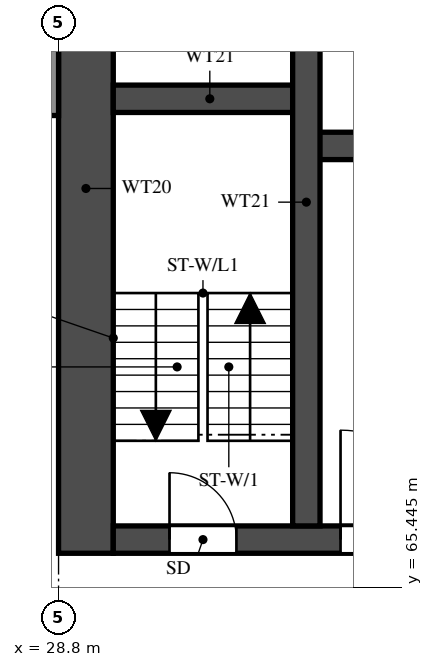
"""IFC4 building model, lengths in metres.
Left out: names, types, materials, properties, quantities, classifications, styles, units other than length and angle.
Written with IfcOpenShell. Run it as: python <this file> out.ifc"""

import sys

from ifc_helpers import new_model, si_unit, direction, frame, frame_2d, origin, place, context, subcontext, project, spatial, rectangle, extrude, element, fill, save


model = new_model("IFC4")
c1 = context("Model", 3, precision=1e-05, world=origin(), true_north=direction((0.0, 1.0)))
c2 = subcontext(c1, "Body", "Model", "MODEL_VIEW")
j1 = project(units=[si_unit("LENGTHUNIT", "METRE"), si_unit("PLANEANGLEUNIT", "RADIAN")], contexts=[c1])
p1 = place(None, origin())
s1 = spatial("IfcSite", under=j1, at=p1, CompositionType="ELEMENT")
p2 = place(p1, origin())
s2 = spatial("IfcBuilding", under=s1, at=p2, CompositionType="ELEMENT")
p3 = place(p2, frame((0.0, 0.0, 69.0)))
s3 = spatial("IfcBuildingStorey", under=s2, at=p3, CompositionType="ELEMENT", Elevation=69.0)
p4 = place(p3, frame((29.25, 66.0, 0.0), z_axis=(0.0, 0.0, 1.0), x_axis=(0.0, 1.0, 0.0)))
e1 = element("IfcWall", 1, at=p4, inside=s3, PredefinedType="SHEAR", context=c2, shape_type="SweptSolid", body=[
    extrude(rectangle(XDim=12.0, YDim=0.9, at=frame_2d((6.0, 0.0))), origin(), (0.0, 0.0, 1.0), 3.18),
])
p5 = place(p3, frame((29.7, 66.225, 0.0), z_axis=(0.0, 0.0, 1.0), x_axis=(1.0, 0.0, 0.0)))
e2 = element("IfcWall", 2, at=p5, inside=s3, PredefinedType="SHEAR", context=c2, shape_type="SweptSolid", body=[
    extrude(rectangle(XDim=41.4, YDim=0.45, at=frame_2d((20.7, 0.0))), origin(), (0.0, 0.0, 1.0), 3.18),
])
p6 = place(p5, frame((0.925, 0.0, 0.0)))
e3 = element("IfcOpeningElement", 3, at=p6, cuts=e2, PredefinedType="OPENING", context=c2, shape_type="SweptSolid", body=[
    extrude(rectangle(XDim=1.1, YDim=2.1, at=frame_2d((0.55, 1.05))), frame((0.0, 0.235, 0.0), z_axis=(0.0, -1.0, 0.0), x_axis=(1.0, 0.0, 0.0)), (0.0, 0.0, 1.0), 0.47),
])
p7 = place(p5, frame((3.738, 0.0, 0.0)))
e4 = element("IfcOpeningElement", 4, at=p7, cuts=e2, PredefinedType="OPENING", context=c2, shape_type="SweptSolid", body=[
    extrude(rectangle(XDim=1.8, YDim=2.1, at=frame_2d((0.9, 1.05))), frame((0.0, 0.235, 0.0), z_axis=(0.0, -1.0, 0.0), x_axis=(1.0, 0.0, 0.0)), (0.0, 0.0, 1.0), 0.47),
])
p8 = place(p3, frame((32.875, 72.7, 0.0), z_axis=(0.0, 0.0, 1.0), x_axis=(1.0, 0.0, 0.0)))
e5 = element("IfcWall", 5, at=p8, inside=s3, PredefinedType="SHEAR", context=c2, shape_type="SweptSolid", body=[
    extrude(rectangle(XDim=35.05, YDim=0.45, at=frame_2d((17.525, 0.0))), origin(), (0.0, 0.0, 1.0), 3.18),
])
p9 = place(p8, frame((19.8, 0.0, 0.0)))
e6 = element("IfcOpeningElement", 6, at=p9, cuts=e5, PredefinedType="OPENING", context=c2, shape_type="SweptSolid", body=[
    extrude(rectangle(XDim=1.1, YDim=2.1, at=frame_2d((0.55, 1.05))), frame((0.0, 0.235, 0.0), z_axis=(0.0, -1.0, 0.0), x_axis=(1.0, 0.0, 0.0)), (0.0, 0.0, 1.0), 0.47),
])
p10 = place(p8, frame((27.65, 0.0, 0.0)))
e7 = element("IfcOpeningElement", 7, at=p10, cuts=e5, PredefinedType="OPENING", context=c2, shape_type="SweptSolid", body=[
    extrude(rectangle(XDim=1.1, YDim=2.1, at=frame_2d((0.55, 1.05))), frame((0.0, 0.235, 0.0), z_axis=(0.0, -1.0, 0.0), x_axis=(1.0, 0.0, 0.0)), (0.0, 0.0, 1.0), 0.47),
])
p11 = place(p8, frame((30.25, 0.0, 0.0)))
e8 = element("IfcOpeningElement", 8, at=p11, cuts=e5, PredefinedType="OPENING", context=c2, shape_type="SweptSolid", body=[
    extrude(rectangle(XDim=1.1, YDim=2.1, at=frame_2d((0.55, 1.05))), frame((0.0, 0.235, 0.0), z_axis=(0.0, -1.0, 0.0), x_axis=(1.0, 0.0, 0.0)), (0.0, 0.0, 1.0), 0.47),
])
p12 = place(p8, frame((3.75, 0.0, 0.0)))
e9 = element("IfcOpeningElement", 9, at=p12, cuts=e5, PredefinedType="OPENING", context=c2, shape_type="SweptSolid", body=[
    extrude(rectangle(XDim=1.1, YDim=2.1, at=frame_2d((0.55, 1.05))), frame((0.0, 0.235, 0.0), z_axis=(0.0, -1.0, 0.0), x_axis=(1.0, 0.0, 0.0)), (0.0, 0.0, 1.0), 0.47),
])
p13 = place(p8, frame((6.5, 0.0, 0.0)))
e10 = element("IfcOpeningElement", 10, at=p13, cuts=e5, PredefinedType="OPENING", context=c2, shape_type="SweptSolid", body=[
    extrude(rectangle(XDim=1.1, YDim=2.1, at=frame_2d((0.55, 1.05))), frame((0.0, 0.235, 0.0), z_axis=(0.0, -1.0, 0.0), x_axis=(1.0, 0.0, 0.0)), (0.0, 0.0, 1.0), 0.47),
])
p14 = place(p8, frame((9.25, 0.0, 0.0)))
e11 = element("IfcOpeningElement", 11, at=p14, cuts=e5, PredefinedType="OPENING", context=c2, shape_type="SweptSolid", body=[
    extrude(rectangle(XDim=1.1, YDim=2.1, at=frame_2d((0.55, 1.05))), frame((0.0, 0.235, 0.0), z_axis=(0.0, -1.0, 0.0), x_axis=(1.0, 0.0, 0.0)), (0.0, 0.0, 1.0), 0.47),
])
p15 = place(p8, frame((12.0, 0.0, 0.0)))
e12 = element("IfcOpeningElement", 12, at=p15, cuts=e5, PredefinedType="OPENING", context=c2, shape_type="SweptSolid", body=[
    extrude(rectangle(XDim=1.1, YDim=2.1, at=frame_2d((0.55, 1.05))), frame((0.0, 0.235, 0.0), z_axis=(0.0, -1.0, 0.0), x_axis=(1.0, 0.0, 0.0)), (0.0, 0.0, 1.0), 0.47),
])
p16 = place(p8, frame((14.75, 0.0, 0.0)))
e13 = element("IfcOpeningElement", 13, at=p16, cuts=e5, PredefinedType="OPENING", context=c2, shape_type="SweptSolid", body=[
    extrude(rectangle(XDim=1.1, YDim=2.1, at=frame_2d((0.55, 1.05))), frame((0.0, 0.235, 0.0), z_axis=(0.0, -1.0, 0.0), x_axis=(1.0, 0.0, 0.0)), (0.0, 0.0, 1.0), 0.47),
])
p17 = place(p8, frame((17.5, 0.0, 0.0)))
e14 = element("IfcOpeningElement", 14, at=p17, cuts=e5, PredefinedType="OPENING", context=c2, shape_type="SweptSolid", body=[
    extrude(rectangle(XDim=1.1, YDim=2.1, at=frame_2d((0.55, 1.05))), frame((0.0, 0.235, 0.0), z_axis=(0.0, -1.0, 0.0), x_axis=(1.0, 0.0, 0.0)), (0.0, 0.0, 1.0), 0.47),
])
p18 = place(p8, frame((0.913, 0.0, 0.0)))
e15 = element("IfcOpeningElement", 15, at=p18, cuts=e5, PredefinedType="OPENING", context=c2, shape_type="SweptSolid", body=[
    extrude(rectangle(XDim=1.1, YDim=2.1, at=frame_2d((0.55, 1.05))), frame((0.0, 0.235, 0.0), z_axis=(0.0, -1.0, 0.0), x_axis=(1.0, 0.0, 0.0)), (0.0, 0.0, 1.0), 0.47),
])
p19 = place(p3, frame((29.7, 73.475, 0.0), z_axis=(0.0, 0.0, 1.0), x_axis=(1.0, 0.0, 0.0)))
e16 = element("IfcWall", 16, at=p19, inside=s3, PredefinedType="SHEAR", context=c2, shape_type="SweptSolid", body=[
    extrude(rectangle(XDim=3.175, YDim=0.45, at=frame_2d((1.587, 0.0))), origin(), (0.0, 0.0, 1.0), 3.18),
])
p20 = place(p3, frame((32.875, 66.45, 0.0), z_axis=(0.0, 0.0, 1.0), x_axis=(0.0, 1.0, 0.0)))
e17 = element("IfcWall", 17, at=p20, inside=s3, PredefinedType="SHEAR", context=c2, shape_type="SweptSolid", body=[
    extrude(rectangle(XDim=10.65, YDim=0.45, at=frame_2d((5.325, 0.0))), origin(), (0.0, 0.0, 1.0), 3.18),
])
p21 = place(p3, frame((28.7, 73.2, 0.0), z_axis=(0.0, 0.0, 1.0), x_axis=(0.0, 1.0, 0.0)))
e18 = element("IfcWall", 18, at=p21, inside=s3, PredefinedType="SOLIDWALL", context=c2, shape_type="SweptSolid", body=[
    extrude(rectangle(XDim=4.8, YDim=0.2, at=frame_2d((2.4, 0.0))), origin(), (0.0, 0.0, 1.0), 3.18),
])
p22 = place(p6, origin())
e19 = element("IfcDoor", 19, at=p22, inside=s3, OperationType="SINGLE_SWING_LEFT", PredefinedType="DOOR", context=c2, shape_type="SweptSolid", body=[
    extrude(rectangle(XDim=1.1, YDim=2.1, at=frame_2d((0.55, 1.05))), frame((0.0, 0.025, 0.0), z_axis=(0.0, -1.0, 0.0), x_axis=(1.0, 0.0, 0.0)), (0.0, 0.0, 1.0), 0.05),
])
fill(e3, e19)
p23 = place(p7, origin())
e20 = element("IfcDoor", 20, at=p23, inside=s3, OperationType="DOUBLE_DOOR_SINGLE_SWING", PredefinedType="DOOR", context=c2, shape_type="SweptSolid", body=[
    extrude(rectangle(XDim=1.8, YDim=2.1, at=frame_2d((0.9, 1.05))), frame((0.0, 0.025, 0.0), z_axis=(0.0, -1.0, 0.0), x_axis=(1.0, 0.0, 0.0)), (0.0, 0.0, 1.0), 0.05),
])
fill(e4, e20)
save(model, sys.argv[1])
